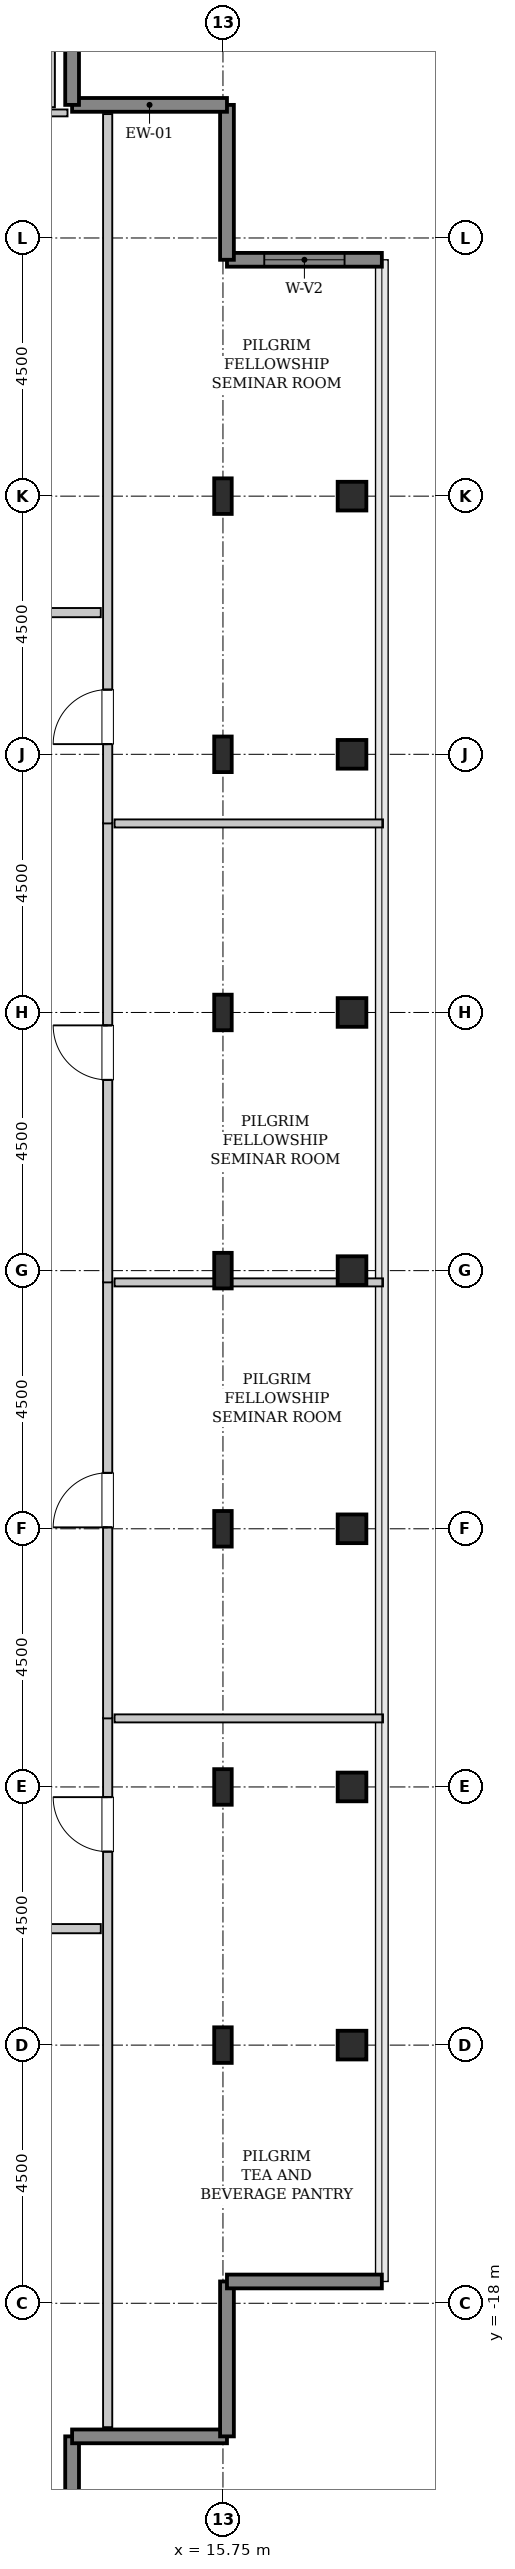
"""IFC4 building model, lengths in metres.
Left out: names, types, materials, properties, quantities, classifications, styles, units other than length and angle.
Written with IfcOpenShell. Run it as: python <this file> out.ifc"""

import sys

from ifc_helpers import new_model, si_unit, direction, frame, frame_2d, origin, origin_2d, place, context, subcontext, project, spatial, rectangle, hollow_rectangle, i_section, extrude, source, transform, mapped, element, fill, save


model = new_model("IFC4")
c1 = context("Model", 3, precision=1e-05, world=origin(), true_north=direction((0.0, 1.0)))
c2 = subcontext(c1, "Body", "Model", "MODEL_VIEW")
j1 = project(units=[si_unit("LENGTHUNIT", "METRE"), si_unit("PLANEANGLEUNIT", "RADIAN")], contexts=[c1])
p1 = place(None, origin())
s1 = spatial("IfcSite", under=j1, at=p1, CompositionType="ELEMENT")
p2 = place(p1, origin())
s2 = spatial("IfcBuilding", under=s1, at=p2, CompositionType="ELEMENT")
p3 = place(p2, frame((0.0, 0.0, 341.4)))
s3 = spatial("IfcBuildingStorey", under=s2, at=p3, CompositionType="ELEMENT", Elevation=341.4)
m1 = source(origin(), c2, "Body", "SweptSolid", [
    extrude(i_section(OverallWidth=0.305, OverallDepth=0.62, WebThickness=0.021, FlangeThickness=0.04, FilletRadius=0.027, at=origin_2d()), origin(), (0.0, 0.0, 1.0), 3.8),
])
for number, where, z_axis, x_axis in (
    (1, (15.75, -13.5, 0.0), (0.0, 0.0, 1.0), (1.0, 0.0, 0.0)),
    (2, (15.75, -9.0, 0.0), (0.0, 0.0, 1.0), (1.0, 0.0, 0.0)),
    (3, (15.75, -4.5, 0.0), (0.0, 0.0, 1.0), (1.0, 0.0, 0.0)),
    (4, (15.75, 0.0, 0.0), (0.0, 0.0, 1.0), (1.0, 0.0, 0.0)),
    (5, (15.75, 4.5, 0.0), (0.0, 0.0, 1.0), (1.0, 0.0, 0.0)),
    (6, (15.75, 9.0, 0.0), (0.0, 0.0, 1.0), (1.0, 0.0, 0.0)),
    (7, (15.75, 13.5, 0.0), (0.0, 0.0, 1.0), (1.0, 0.0, 0.0)),
):
    element("IfcColumn", number, at=place(p3, frame(where, z_axis=z_axis, x_axis=x_axis)), inside=s3, PredefinedType="COLUMN", context=c2, shape_type="MappedRepresentation", body=[
        mapped(m1, transform((0.0, 0.0, 0.0), x_axis=(1.0, 0.0, 0.0), y_axis=(0.0, 1.0, 0.0), z_axis=(0.0, 0.0, 1.0), scale=1.0)),
    ])
m2 = source(origin(), c2, "Body", "SweptSolid", [
    extrude(hollow_rectangle(XDim=0.5, YDim=0.5, WallThickness=0.025, InnerFilletRadius=0.025, OuterFilletRadius=0.05, at=origin_2d()), origin(), (0.0, 0.0, 1.0), 3.8),
])
for number, where, z_axis, x_axis in (
    (8, (18.0, -13.5, 0.0), (0.0, 0.0, 1.0), (1.0, 0.0, 0.0)),
    (9, (18.0, -9.0, 0.0), (0.0, 0.0, 1.0), (1.0, 0.0, 0.0)),
    (10, (18.0, -4.5, 0.0), (0.0, 0.0, 1.0), (1.0, 0.0, 0.0)),
    (11, (18.0, 0.0, 0.0), (0.0, 0.0, 1.0), (1.0, 0.0, 0.0)),
    (12, (18.0, 4.5, 0.0), (0.0, 0.0, 1.0), (1.0, 0.0, 0.0)),
    (13, (18.0, 9.0, 0.0), (0.0, 0.0, 1.0), (1.0, 0.0, 0.0)),
    (14, (18.0, 13.5, 0.0), (0.0, 0.0, 1.0), (1.0, 0.0, 0.0)),
):
    element("IfcColumn", number, at=place(p3, frame(where, z_axis=z_axis, x_axis=x_axis)), inside=s3, PredefinedType="COLUMN", context=c2, shape_type="MappedRepresentation", body=[
        mapped(m2, transform((0.0, 0.0, 0.0), x_axis=(1.0, 0.0, 0.0), y_axis=(0.0, 1.0, 0.0), z_axis=(0.0, 0.0, 1.0), scale=1.0)),
    ])
m3 = source(origin(), c2, "Body", "SweptSolid", [
    extrude(rectangle(XDim=2.7, YDim=0.24, at=frame_2d((1.35, 0.0))), origin(), (0.0, 0.0, 1.0), 3.55),
])
p4 = place(p3, frame((18.52, 17.62, 0.0), z_axis=(0.0, 0.0, 1.0), x_axis=(-1.0, 0.0, 0.0)))
e15 = element("IfcWall", 15, at=p4, inside=s3, PredefinedType="SHEAR", context=c2, shape_type="MappedRepresentation", body=[
    mapped(m3, transform((0.0, 0.0, 0.0), x_axis=(1.0, 0.0, 0.0), y_axis=(0.0, 1.0, 0.0), z_axis=(0.0, 0.0, 1.0), scale=1.0)),
])
p5 = place(p4, frame((0.65, 0.0, 0.85)))
e16 = element("IfcOpeningElement", 16, at=p5, cuts=e15, PredefinedType="OPENING", context=c2, shape_type="SweptSolid", body=[
    extrude(rectangle(XDim=1.4, YDim=1.8, at=frame_2d((0.7, 0.9))), frame((0.0, 0.13, 0.0), z_axis=(0.0, -1.0, 0.0), x_axis=(1.0, 0.0, 0.0)), (0.0, 0.0, 1.0), 0.26),
])
for number, where, z_axis, x_axis in (
    (17, (15.82, 17.62, 0.0), (0.0, 0.0, 1.0), (0.0, 1.0, 0.0)),
    (18, (15.82, 20.32, 0.0), (0.0, 0.0, 1.0), (-1.0, 0.0, 0.0)),
    (19, (13.12, 20.32, 0.0), (0.0, 0.0, 1.0), (0.0, 1.0, 0.0)),
    (20, (13.12, -23.02, 0.0), (0.0, 0.0, 1.0), (0.0, 1.0, 0.0)),
    (21, (13.12, -20.32, 0.0), (0.0, 0.0, 1.0), (1.0, 0.0, 0.0)),
    (22, (15.82, -20.32, 0.0), (0.0, 0.0, 1.0), (0.0, 1.0, 0.0)),
    (23, (15.82, -17.62, 0.0), (0.0, 0.0, 1.0), (1.0, 0.0, 0.0)),
):
    element("IfcWall", number, at=place(p3, frame(where, z_axis=z_axis, x_axis=x_axis)), inside=s3, PredefinedType="SHEAR", context=c2, shape_type="MappedRepresentation", body=[
        mapped(m3, transform((0.0, 0.0, 0.0), x_axis=(1.0, 0.0, 0.0), y_axis=(0.0, 1.0, 0.0), z_axis=(0.0, 0.0, 1.0), scale=1.0)),
    ])
m4 = source(origin(), c2, "Body", "SweptSolid", [
    extrude(rectangle(XDim=2.86, YDim=0.12, at=frame_2d((1.43, 0.0))), origin(), (0.0, 0.0, 1.0), 3.535),
])
p6 = place(p3, frame((10.18, 20.18, 0.0), z_axis=(0.0, 0.0, 1.0), x_axis=(1.0, 0.0, 0.0)))
e24 = element("IfcWall", 24, at=p6, inside=s3, PredefinedType="PLUMBINGWALL", context=c2, shape_type="MappedRepresentation", body=[
    mapped(m4, transform((0.0, 0.0, 0.0), x_axis=(1.0, 0.0, 0.0), y_axis=(0.0, 1.0, 0.0), z_axis=(0.0, 0.0, 1.0), scale=1.0)),
])
p7 = place(p6, frame((0.895, 0.0, 0.0)))
e25 = element("IfcOpeningElement", 25, at=p7, cuts=e24, PredefinedType="OPENING", context=c2, shape_type="SweptSolid", body=[
    extrude(rectangle(XDim=0.85, YDim=2.1, at=frame_2d((0.425, 1.05))), frame((0.0, 0.07, 0.0), z_axis=(0.0, -1.0, 0.0), x_axis=(1.0, 0.0, 0.0)), (0.0, 0.0, 1.0), 0.14),
])
m5 = source(origin(), c2, "Body", "SweptSolid", [
    extrude(rectangle(XDim=2.76, YDim=0.12, at=frame_2d((1.38, 0.0))), origin(), (0.0, 0.0, 1.0), 3.535),
])
p8 = place(p3, frame((12.76, 20.28, 0.0), z_axis=(0.0, 0.0, 1.0), x_axis=(0.0, 1.0, 0.0)))
e26 = element("IfcWall", 26, at=p8, inside=s3, PredefinedType="PLUMBINGWALL", context=c2, shape_type="MappedRepresentation", body=[
    mapped(m5, transform((0.0, 0.0, 0.0), x_axis=(1.0, 0.0, 0.0), y_axis=(0.0, 1.0, 0.0), z_axis=(0.0, 0.0, 1.0), scale=1.0)),
])
m6 = source(origin(), c2, "Body", "SweptSolid", [
    extrude(rectangle(XDim=12.365, YDim=0.16, at=frame_2d((6.183, 0.0))), origin(), (0.0, 0.0, 1.0), 3.535),
])
p9 = place(p3, frame((13.74, -20.16, 0.0), z_axis=(0.0, 0.0, 1.0), x_axis=(0.0, 1.0, 0.0)))
e27 = element("IfcWall", 27, at=p9, inside=s3, PredefinedType="PARTITIONING", context=c2, shape_type="MappedRepresentation", body=[
    mapped(m6, transform((0.0, 0.0, 0.0), x_axis=(1.0, 0.0, 0.0), y_axis=(0.0, 1.0, 0.0), z_axis=(0.0, 0.0, 1.0), scale=1.0)),
])
p10 = place(p9, frame((10.032, 0.0, 0.0)))
e28 = element("IfcOpeningElement", 28, at=p10, cuts=e27, PredefinedType="OPENING", context=c2, shape_type="SweptSolid", body=[
    extrude(rectangle(XDim=0.95, YDim=2.1, at=frame_2d((0.475, 1.05))), frame((0.0, 0.09, 0.0), z_axis=(0.0, -1.0, 0.0), x_axis=(1.0, 0.0, 0.0)), (0.0, 0.0, 1.0), 0.18),
])
m7 = source(origin(), c2, "Body", "SweptSolid", [
    extrude(rectangle(XDim=4.68, YDim=0.14, at=frame_2d((2.34, 0.0))), origin(), (0.0, 0.0, 1.0), 3.535),
])
p11 = place(p3, frame((13.86, -7.805, 0.0), z_axis=(0.0, 0.0, 1.0), x_axis=(1.0, 0.0, 0.0)))
e29 = element("IfcWall", 29, at=p11, inside=s3, PredefinedType="PARTITIONING", context=c2, shape_type="MappedRepresentation", body=[
    mapped(m7, transform((0.0, 0.0, 0.0), x_axis=(1.0, 0.0, 0.0), y_axis=(0.0, 1.0, 0.0), z_axis=(0.0, 0.0, 1.0), scale=1.0)),
])
m8 = source(origin(), c2, "Body", "SweptSolid", [
    extrude(rectangle(XDim=7.61, YDim=0.16, at=frame_2d((3.805, 0.0))), origin(), (0.0, 0.0, 1.0), 3.535),
])
p12 = place(p3, frame((13.74, -7.805, 0.0), z_axis=(0.0, 0.0, 1.0), x_axis=(0.0, 1.0, 0.0)))
e30 = element("IfcWall", 30, at=p12, inside=s3, PredefinedType="PARTITIONING", context=c2, shape_type="MappedRepresentation", body=[
    mapped(m8, transform((0.0, 0.0, 0.0), x_axis=(1.0, 0.0, 0.0), y_axis=(0.0, 1.0, 0.0), z_axis=(0.0, 0.0, 1.0), scale=1.0)),
])
p13 = place(p12, frame((3.33, 0.0, 0.0)))
e31 = element("IfcOpeningElement", 31, at=p13, cuts=e30, PredefinedType="OPENING", context=c2, shape_type="SweptSolid", body=[
    extrude(rectangle(XDim=0.95, YDim=2.1, at=frame_2d((0.475, 1.05))), frame((0.0, 0.09, 0.0), z_axis=(0.0, -1.0, 0.0), x_axis=(1.0, 0.0, 0.0)), (0.0, 0.0, 1.0), 0.18),
])
m9 = source(origin(), c2, "Body", "SweptSolid", [
    extrude(rectangle(XDim=4.68, YDim=0.14, at=frame_2d((2.34, 0.0))), origin(), (0.0, 0.0, 1.0), 2.975),
])
p14 = place(p3, frame((13.86, -0.205, 0.0), z_axis=(0.0, 0.0, 1.0), x_axis=(1.0, 0.0, 0.0)))
e32 = element("IfcWall", 32, at=p14, inside=s3, PredefinedType="PARTITIONING", context=c2, shape_type="MappedRepresentation", body=[
    mapped(m9, transform((0.0, 0.0, 0.0), x_axis=(1.0, 0.0, 0.0), y_axis=(0.0, 1.0, 0.0), z_axis=(0.0, 0.0, 1.0), scale=1.0)),
])
m10 = source(origin(), c2, "Body", "SweptSolid", [
    extrude(rectangle(XDim=8.01, YDim=0.16, at=frame_2d((4.005, 0.0))), origin(), (0.0, 0.0, 1.0), 3.535),
])
p15 = place(p3, frame((13.74, -0.205, 0.0), z_axis=(0.0, 0.0, 1.0), x_axis=(0.0, 1.0, 0.0)))
e33 = element("IfcWall", 33, at=p15, inside=s3, PredefinedType="PARTITIONING", context=c2, shape_type="MappedRepresentation", body=[
    mapped(m10, transform((0.0, 0.0, 0.0), x_axis=(1.0, 0.0, 0.0), y_axis=(0.0, 1.0, 0.0), z_axis=(0.0, 0.0, 1.0), scale=1.0)),
])
p16 = place(p15, frame((3.53, 0.0, 0.0)))
e34 = element("IfcOpeningElement", 34, at=p16, cuts=e33, PredefinedType="OPENING", context=c2, shape_type="SweptSolid", body=[
    extrude(rectangle(XDim=0.95, YDim=2.1, at=frame_2d((0.475, 1.05))), frame((0.0, 0.09, 0.0), z_axis=(0.0, -1.0, 0.0), x_axis=(1.0, 0.0, 0.0)), (0.0, 0.0, 1.0), 0.18),
])
p17 = place(p3, frame((13.86, 7.795, 0.0), z_axis=(0.0, 0.0, 1.0), x_axis=(1.0, 0.0, 0.0)))
e35 = element("IfcWall", 35, at=p17, inside=s3, PredefinedType="PARTITIONING", context=c2, shape_type="MappedRepresentation", body=[
    mapped(m7, transform((0.0, 0.0, 0.0), x_axis=(1.0, 0.0, 0.0), y_axis=(0.0, 1.0, 0.0), z_axis=(0.0, 0.0, 1.0), scale=1.0)),
])
p18 = place(p3, frame((13.74, 7.795, 0.0), z_axis=(0.0, 0.0, 1.0), x_axis=(0.0, 1.0, 0.0)))
e36 = element("IfcWall", 36, at=p18, inside=s3, PredefinedType="PARTITIONING", context=c2, shape_type="MappedRepresentation", body=[
    mapped(m6, transform((0.0, 0.0, 0.0), x_axis=(1.0, 0.0, 0.0), y_axis=(0.0, 1.0, 0.0), z_axis=(0.0, 0.0, 1.0), scale=1.0)),
])
p19 = place(p18, frame((1.383, 0.0, 0.0)))
e37 = element("IfcOpeningElement", 37, at=p19, cuts=e36, PredefinedType="OPENING", context=c2, shape_type="SweptSolid", body=[
    extrude(rectangle(XDim=0.95, YDim=2.1, at=frame_2d((0.475, 1.05))), frame((0.0, 0.09, 0.0), z_axis=(0.0, -1.0, 0.0), x_axis=(1.0, 0.0, 0.0)), (0.0, 0.0, 1.0), 0.18),
])
m11 = source(origin(), c2, "Body", "SweptSolid", [
    extrude(rectangle(XDim=3.66, YDim=0.16, at=frame_2d((1.83, 0.0))), origin(), (0.0, 0.0, 1.0), 3.535),
])
p20 = place(p3, frame((9.96, 11.47, 0.0), z_axis=(0.0, 0.0, 1.0), x_axis=(1.0, 0.0, 0.0)))
e38 = element("IfcWall", 38, at=p20, inside=s3, PredefinedType="PARTITIONING", context=c2, shape_type="MappedRepresentation", body=[
    mapped(m11, transform((0.0, 0.0, 0.0), x_axis=(1.0, 0.0, 0.0), y_axis=(0.0, 1.0, 0.0), z_axis=(0.0, 0.0, 1.0), scale=1.0)),
])
p21 = place(p20, frame((1.355, 0.0, 0.0)))
e39 = element("IfcOpeningElement", 39, at=p21, cuts=e38, PredefinedType="OPENING", context=c2, shape_type="SweptSolid", body=[
    extrude(rectangle(XDim=0.95, YDim=2.1, at=frame_2d((0.475, 1.05))), frame((0.0, 0.09, 0.0), z_axis=(0.0, -1.0, 0.0), x_axis=(1.0, 0.0, 0.0)), (0.0, 0.0, 1.0), 0.18),
])
m12 = source(origin(), c2, "Body", "SweptSolid", [
    extrude(rectangle(XDim=5.225, YDim=0.16, at=frame_2d((2.613, 0.0))), origin(), (0.0, 0.0, 1.0), 3.535),
])
p22 = place(p3, frame((8.395, -11.47, 0.0), z_axis=(0.0, 0.0, 1.0), x_axis=(1.0, 0.0, 0.0)))
e40 = element("IfcWall", 40, at=p22, inside=s3, PredefinedType="PARTITIONING", context=c2, shape_type="MappedRepresentation", body=[
    mapped(m12, transform((0.0, 0.0, 0.0), x_axis=(1.0, 0.0, 0.0), y_axis=(0.0, 1.0, 0.0), z_axis=(0.0, 0.0, 1.0), scale=1.0)),
])
p23 = place(p22, frame((2.137, 0.0, 0.0)))
e41 = element("IfcOpeningElement", 41, at=p23, cuts=e40, PredefinedType="OPENING", context=c2, shape_type="SweptSolid", body=[
    extrude(rectangle(XDim=0.95, YDim=2.1, at=frame_2d((0.475, 1.05))), frame((0.0, 0.09, 0.0), z_axis=(0.0, -1.0, 0.0), x_axis=(1.0, 0.0, 0.0)), (0.0, 0.0, 1.0), 0.18),
])
m13 = source(origin(), c2, "Body", "SweptSolid", [
    extrude(rectangle(XDim=1.4, YDim=1.8, at=frame_2d((0.7, 0.9))), frame((0.0, 0.03, 0.0), z_axis=(0.0, -1.0, 0.0), x_axis=(1.0, 0.0, 0.0)), (0.0, 0.0, 1.0), 0.06),
])
p24 = place(p5, origin())
e42 = element("IfcWindow", 42, at=p24, inside=s3, PartitioningType="SINGLE_PANEL", PredefinedType="WINDOW", context=c2, shape_type="MappedRepresentation", body=[
    mapped(m13, transform((0.0, 0.0, 0.0), x_axis=(1.0, 0.0, 0.0), y_axis=(0.0, 1.0, 0.0), z_axis=(0.0, 0.0, 1.0), scale=1.0)),
])
fill(e16, e42)
m14 = source(origin(), c2, "Body", "SweptSolid", [
    extrude(rectangle(XDim=0.95, YDim=2.1, at=frame_2d((0.475, 1.05))), frame((0.0, 0.025, 0.0), z_axis=(0.0, -1.0, 0.0), x_axis=(1.0, 0.0, 0.0)), (0.0, 0.0, 1.0), 0.05),
])
p25 = place(p10, origin())
e43 = element("IfcDoor", 43, at=p25, inside=s3, OperationType="SINGLE_SWING_RIGHT", PredefinedType="DOOR", context=c2, shape_type="MappedRepresentation", body=[
    mapped(m14, transform((0.0, 0.0, 0.0), x_axis=(1.0, 0.0, 0.0), y_axis=(0.0, 1.0, 0.0), z_axis=(0.0, 0.0, 1.0), scale=1.0)),
])
fill(e28, e43)
p26 = place(p13, origin())
e44 = element("IfcDoor", 44, at=p26, inside=s3, OperationType="SINGLE_SWING_LEFT", PredefinedType="DOOR", context=c2, shape_type="MappedRepresentation", body=[
    mapped(m14, transform((0.0, 0.0, 0.0), x_axis=(1.0, 0.0, 0.0), y_axis=(0.0, 1.0, 0.0), z_axis=(0.0, 0.0, 1.0), scale=1.0)),
])
fill(e31, e44)
p27 = place(p16, origin())
e45 = element("IfcDoor", 45, at=p27, inside=s3, OperationType="SINGLE_SWING_RIGHT", PredefinedType="DOOR", context=c2, shape_type="MappedRepresentation", body=[
    mapped(m14, transform((0.0, 0.0, 0.0), x_axis=(1.0, 0.0, 0.0), y_axis=(0.0, 1.0, 0.0), z_axis=(0.0, 0.0, 1.0), scale=1.0)),
])
fill(e34, e45)
p28 = place(p19, origin())
e46 = element("IfcDoor", 46, at=p28, inside=s3, OperationType="SINGLE_SWING_LEFT", PredefinedType="DOOR", context=c2, shape_type="MappedRepresentation", body=[
    mapped(m14, transform((0.0, 0.0, 0.0), x_axis=(1.0, 0.0, 0.0), y_axis=(0.0, 1.0, 0.0), z_axis=(0.0, 0.0, 1.0), scale=1.0)),
])
fill(e37, e46)
save(model, sys.argv[1])
